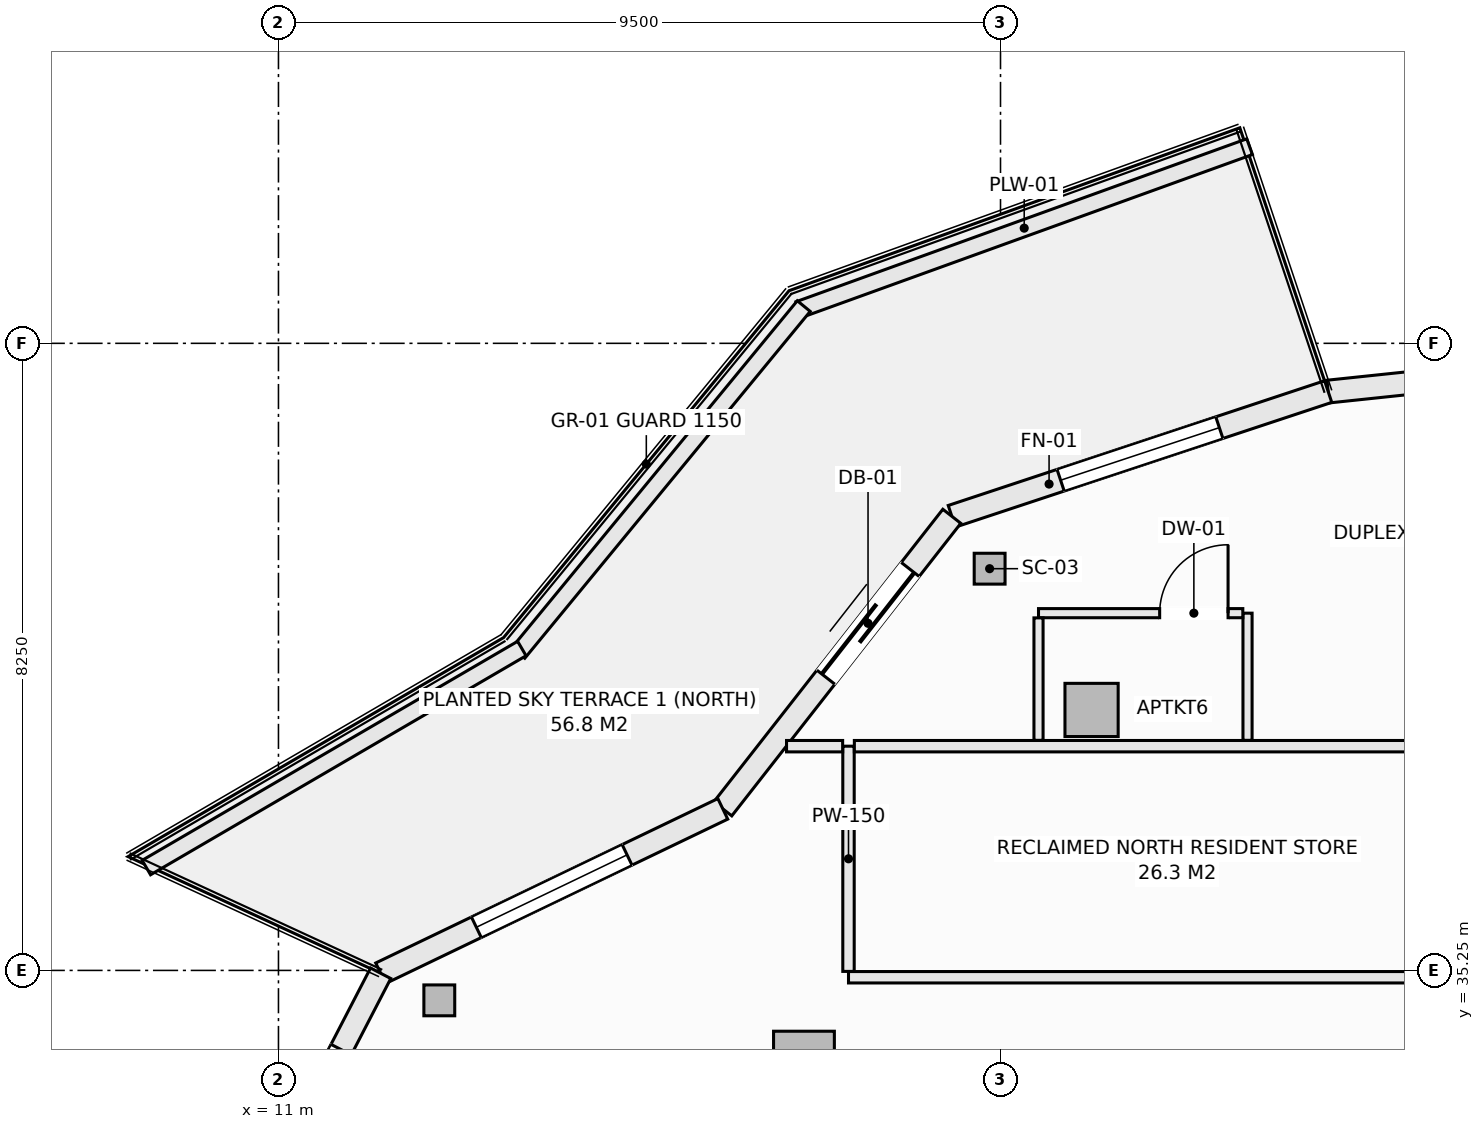
"""IFC4 building model, lengths in metres.
Left out: names, types, materials, properties, quantities, classifications, styles, units other than length and angle.
Written with IfcOpenShell. Run it as: python <this file> out.ifc"""

import sys

from ifc_helpers import new_model, si_unit, direction, frame, frame_2d, origin, origin_2d, place, context, subcontext, project, spatial, rectangle, hollow_rectangle, extrude, element, fill, save


model = new_model("IFC4")
c1 = context("Model", 3, precision=1e-05, world=origin(), true_north=direction((0.0, 1.0)))
c2 = subcontext(c1, "Body", "Model", "MODEL_VIEW")
j1 = project(units=[si_unit("LENGTHUNIT", "METRE"), si_unit("PLANEANGLEUNIT", "RADIAN")], contexts=[c1])
p1 = place(None, origin())
s1 = spatial("IfcSite", under=j1, at=p1, CompositionType="ELEMENT")
p2 = place(p1, origin())
s2 = spatial("IfcBuilding", under=s1, at=p2, CompositionType="ELEMENT")
p3 = place(p2, frame((0.0, 0.0, 272.3)))
s3 = spatial("IfcBuildingStorey", under=s2, at=p3, CompositionType="ELEMENT", Elevation=272.3)
for number, where, z_axis, x_axis in (
    (1, (20.357, 40.535, -0.27), (0.0, 0.0, 1.0), (1.0, 0.0, 0.0)),
    (2, (13.116, 34.856, -0.27), (0.0, 0.0, 1.0), (1.0, 0.0, 0.0)),
):
    element("IfcColumn", number, at=place(p3, frame(where, z_axis=z_axis, x_axis=x_axis)), inside=s3, PredefinedType="COLUMN", context=c2, shape_type="SweptSolid", body=[
        extrude(hollow_rectangle(XDim=0.406, YDim=0.406, WallThickness=0.016, at=origin_2d()), origin(), (0.0, 0.0, 1.0), 3.25),
    ])
p4 = place(p3, frame((21.698, 38.677, -0.27), z_axis=(0.0, 0.0, 1.0), x_axis=(1.0, 0.0, 0.0)))
e3 = element("IfcColumn", 3, at=p4, inside=s3, PredefinedType="COLUMN", context=c2, shape_type="SweptSolid", body=[
    extrude(rectangle(XDim=0.7, YDim=0.7, at=origin_2d()), origin(), (0.0, 0.0, 1.0), 3.25),
])
p5 = place(p3, frame((17.914, 34.05, -0.27), z_axis=(0.0, 0.0, 1.0), x_axis=(1.0, 0.0, 0.0)))
e4 = element("IfcColumn", 4, at=p5, inside=s3, PredefinedType="PILASTER", context=c2, shape_type="SweptSolid", body=[
    extrude(rectangle(XDim=0.8, YDim=0.8, at=origin_2d()), origin(), (0.0, 0.0, 1.0), 3.25),
])
p6 = place(p3, frame((24.811, 42.865, 0.0), z_axis=(0.0, 0.0, 1.0), x_axis=(0.9944966869, 0.104768028258, 0.0)))
e5 = element("IfcWall", 5, at=p6, inside=s3, PredefinedType="SOLIDWALL", context=c2, shape_type="SweptSolid", body=[
    extrude(rectangle(XDim=5.343, YDim=0.3, at=frame_2d((2.672, 0.0))), origin(), (0.0, 0.0, 1.0), 2.555),
])
p7 = place(p6, frame((1.572, 0.0, 0.72)))
e6 = element("IfcOpeningElement", 6, at=p7, cuts=e5, PredefinedType="OPENING", context=c2, shape_type="SweptSolid", body=[
    extrude(rectangle(XDim=2.2, YDim=1.65, at=frame_2d((1.1, 0.825))), frame((0.0, 0.16, 0.0), z_axis=(0.0, -1.0, 0.0), x_axis=(1.0, 0.0, 0.0)), (0.0, 0.0, 1.0), 0.32),
])
p8 = place(p3, frame((19.859, 41.225, 0.0), z_axis=(0.0, 0.0, 1.0), x_axis=(0.949252744709, 0.314514271001, 0.0)))
e7 = element("IfcWall", 7, at=p8, inside=s3, PredefinedType="SOLIDWALL", context=c2, shape_type="SweptSolid", body=[
    extrude(rectangle(XDim=5.216, YDim=0.3, at=frame_2d((2.608, 0.0))), origin(), (0.0, 0.0, 1.0), 2.555),
])
p9 = place(p8, frame((1.508, 0.0, 0.72)))
e8 = element("IfcOpeningElement", 8, at=p9, cuts=e7, PredefinedType="OPENING", context=c2, shape_type="SweptSolid", body=[
    extrude(rectangle(XDim=2.2, YDim=1.65, at=frame_2d((1.1, 0.825))), frame((0.0, 0.16, 0.0), z_axis=(0.0, -1.0, 0.0), x_axis=(1.0, 0.0, 0.0)), (0.0, 0.0, 1.0), 0.32),
])
p10 = place(p3, frame((16.846, 37.375, 0.0), z_axis=(0.0, 0.0, 1.0), x_axis=(0.616413297421, 0.78742278781, 0.0)))
e9 = element("IfcWall", 9, at=p10, inside=s3, PredefinedType="SOLIDWALL", context=c2, shape_type="SweptSolid", body=[
    extrude(rectangle(XDim=4.888, YDim=0.3, at=frame_2d((2.444, 0.0))), origin(), (0.0, 0.0, 1.0), 2.555),
])
p11 = place(p10, frame((2.2, 0.0, 0.0)))
e10 = element("IfcOpeningElement", 10, at=p11, cuts=e9, PredefinedType="OPENING", context=c2, shape_type="SweptSolid", body=[
    extrude(rectangle(XDim=1.8, YDim=2.25, at=frame_2d((0.9, 1.125))), frame((0.0, 0.16, 0.0), z_axis=(0.0, -1.0, 0.0), x_axis=(1.0, 0.0, 0.0)), (0.0, 0.0, 1.0), 0.32),
])
p12 = place(p3, frame((12.344, 35.212, 0.0), z_axis=(0.0, 0.0, 1.0), x_axis=(0.901346013132, 0.433099716706, 0.0)))
e11 = element("IfcWall", 11, at=p12, inside=s3, PredefinedType="SOLIDWALL", context=c2, shape_type="SweptSolid", body=[
    extrude(rectangle(XDim=4.994, YDim=0.3, at=frame_2d((2.497, 0.0))), origin(), (0.0, 0.0, 1.0), 2.555),
])
p13 = place(p12, frame((1.397, 0.0, 0.72)))
e12 = element("IfcOpeningElement", 12, at=p13, cuts=e11, PredefinedType="OPENING", context=c2, shape_type="SweptSolid", body=[
    extrude(rectangle(XDim=2.2, YDim=1.65, at=frame_2d((1.1, 0.825))), frame((0.0, 0.16, 0.0), z_axis=(0.0, -1.0, 0.0), x_axis=(1.0, 0.0, 0.0)), (0.0, 0.0, 1.0), 0.32),
])
p14 = place(p3, frame((10.293, 31.251, 0.0), z_axis=(0.0, 0.0, 1.0), x_axis=(0.459801070243, 0.888021945564, 0.0)))
e13 = element("IfcWall", 13, at=p14, inside=s3, PredefinedType="SOLIDWALL", context=c2, shape_type="SweptSolid", body=[
    extrude(rectangle(XDim=4.461, YDim=0.3, at=frame_2d((2.23, 0.0))), origin(), (0.0, 0.0, 1.0), 2.555),
])
p15 = place(p14, frame((1.13, 0.0, 0.72)))
e14 = element("IfcOpeningElement", 14, at=p15, cuts=e13, PredefinedType="OPENING", context=c2, shape_type="SweptSolid", body=[
    extrude(rectangle(XDim=2.2, YDim=1.65, at=frame_2d((1.1, 0.825))), frame((0.0, 0.16, 0.0), z_axis=(0.0, -1.0, 0.0), x_axis=(1.0, 0.0, 0.0)), (0.0, 0.0, 1.0), 0.32),
])
p16 = place(p3, frame((17.846, 43.944, 0.0), z_axis=(0.0, 0.0, 1.0), x_axis=(0.940465240036, 0.339889882585, 0.0)))
e15 = element("IfcWall", 15, at=p16, inside=s3, PredefinedType="PARAPET", context=c2, shape_type="SweptSolid", body=[
    extrude(rectangle(XDim=6.307, YDim=0.22, at=frame_2d((3.153, 0.0))), origin(), (0.0, 0.0, 1.0), 0.52),
])
p17 = place(p3, frame((14.156, 39.427, 0.0), z_axis=(0.0, 0.0, 1.0), x_axis=(0.635450933862, 0.772141250455, 0.0)))
e16 = element("IfcWall", 16, at=p17, inside=s3, PredefinedType="PARAPET", context=c2, shape_type="SweptSolid", body=[
    extrude(rectangle(XDim=5.91, YDim=0.22, at=frame_2d((2.955, 0.0))), origin(), (0.0, 0.0, 1.0), 0.52),
])
p18 = place(p3, frame((9.262, 36.603, 0.0), z_axis=(0.0, 0.0, 1.0), x_axis=(0.863803671285, 0.503828559606, 0.0)))
e17 = element("IfcWall", 17, at=p18, inside=s3, PredefinedType="PARAPET", context=c2, shape_type="SweptSolid", body=[
    extrude(rectangle(XDim=5.719, YDim=0.22, at=frame_2d((2.86, 0.0))), origin(), (0.0, 0.0, 1.0), 0.52),
])
p19 = place(p3, frame((18.5, 35.16, 0.0), z_axis=(0.0, 0.0, 1.0), x_axis=(1.0, 0.0, 0.0)))
e18 = element("IfcWall", 18, at=p19, inside=s3, PredefinedType="PARTITIONING", context=c2, shape_type="SweptSolid", body=[
    extrude(rectangle(XDim=8.573, YDim=0.15, at=frame_2d((4.287, 0.0))), origin(), (0.0, 0.0, 1.0), 2.98),
])
p20 = place(p3, frame((18.5, 35.237, 0.0), z_axis=(0.0, 0.0, 1.0), x_axis=(0.0, 1.0, 0.0)))
e19 = element("IfcWall", 19, at=p20, inside=s3, PredefinedType="PARTITIONING", context=c2, shape_type="SweptSolid", body=[
    extrude(rectangle(XDim=2.963, YDim=0.15, at=frame_2d((1.481, 0.0))), origin(), (0.0, 0.0, 1.0), 2.98),
])
p21 = place(p3, frame((17.685, 38.2, 0.0), z_axis=(0.0, 0.0, 1.0), x_axis=(1.0, 0.0, 0.0)))
e20 = element("IfcWall", 20, at=p21, inside=s3, PredefinedType="PARTITIONING", context=c2, shape_type="SweptSolid", body=[
    extrude(rectangle(XDim=0.738, YDim=0.15, at=frame_2d((0.369, 0.0))), origin(), (0.0, 0.0, 1.0), 2.98),
])
p22 = place(p3, frame((18.577, 38.2, 0.0), z_axis=(0.0, 0.0, 1.0), x_axis=(1.0, 0.0, 0.0)))
e21 = element("IfcWall", 21, at=p22, inside=s3, PredefinedType="PARTITIONING", context=c2, shape_type="SweptSolid", body=[
    extrude(rectangle(XDim=8.496, YDim=0.15, at=frame_2d((4.248, 0.0))), origin(), (0.0, 0.0, 1.0), 2.98),
])
p23 = place(p3, frame((23.75, 38.277, 0.0), z_axis=(0.0, 0.0, 1.0), x_axis=(0.0, 1.0, 0.0)))
e22 = element("IfcWall", 22, at=p23, inside=s3, PredefinedType="PARTITIONING", context=c2, shape_type="SweptSolid", body=[
    extrude(rectangle(XDim=1.673, YDim=0.12, at=frame_2d((0.836, 0.0))), origin(), (0.0, 0.0, 1.0), 2.98),
])
p24 = place(p3, frame((21.0, 39.95, 0.0), z_axis=(0.0, 0.0, 1.0), x_axis=(1.0, 0.0, 0.0)))
e23 = element("IfcWall", 23, at=p24, inside=s3, PredefinedType="PARTITIONING", context=c2, shape_type="SweptSolid", body=[
    extrude(rectangle(XDim=2.688, YDim=0.12, at=frame_2d((1.344, 0.0))), origin(), (0.0, 0.0, 1.0), 2.98),
])
p25 = place(p24, frame((1.594, 0.0, 0.0)))
e24 = element("IfcOpeningElement", 24, at=p25, cuts=e23, PredefinedType="OPENING", context=c2, shape_type="SweptSolid", body=[
    extrude(rectangle(XDim=0.9, YDim=2.1, at=frame_2d((0.45, 1.05))), frame((0.0, 0.07, 0.0), z_axis=(0.0, -1.0, 0.0), x_axis=(1.0, 0.0, 0.0)), (0.0, 0.0, 1.0), 0.14),
])
p26 = place(p3, frame((21.0, 38.277, 0.0), z_axis=(0.0, 0.0, 1.0), x_axis=(0.0, 1.0, 0.0)))
e25 = element("IfcWall", 25, at=p26, inside=s3, PredefinedType="PARTITIONING", context=c2, shape_type="SweptSolid", body=[
    extrude(rectangle(XDim=1.611, YDim=0.12, at=frame_2d((0.805, 0.0))), origin(), (0.0, 0.0, 1.0), 2.428),
])
p27 = place(p9, origin())
e26 = element("IfcWindow", 26, at=p27, inside=s3, PartitioningType="SINGLE_PANEL", PredefinedType="WINDOW", context=c2, shape_type="SweptSolid", body=[
    extrude(rectangle(XDim=2.2, YDim=1.65, at=frame_2d((1.1, 0.825))), frame((0.0, 0.03, 0.0), z_axis=(0.0, -1.0, 0.0), x_axis=(1.0, 0.0, 0.0)), (0.0, 0.0, 1.0), 0.06),
])
fill(e8, e26)
p28 = place(p11, origin())
e27 = element("IfcDoor", 27, at=p28, inside=s3, OperationType="SLIDING_TO_LEFT", PredefinedType="DOOR", context=c2, shape_type="SweptSolid", body=[
    extrude(rectangle(XDim=1.8, YDim=2.25, at=frame_2d((0.9, 1.125))), frame((0.0, 0.025, 0.0), z_axis=(0.0, -1.0, 0.0), x_axis=(1.0, 0.0, 0.0)), (0.0, 0.0, 1.0), 0.05),
])
fill(e10, e27)
p29 = place(p13, origin())
e28 = element("IfcWindow", 28, at=p29, inside=s3, PartitioningType="SINGLE_PANEL", PredefinedType="WINDOW", context=c2, shape_type="SweptSolid", body=[
    extrude(rectangle(XDim=2.2, YDim=1.65, at=frame_2d((1.1, 0.825))), frame((0.0, 0.03, 0.0), z_axis=(0.0, -1.0, 0.0), x_axis=(1.0, 0.0, 0.0)), (0.0, 0.0, 1.0), 0.06),
])
fill(e12, e28)
p30 = place(p15, origin())
e29 = element("IfcWindow", 29, at=p30, inside=s3, PartitioningType="SINGLE_PANEL", PredefinedType="WINDOW", context=c2, shape_type="SweptSolid", body=[
    extrude(rectangle(XDim=2.2, YDim=1.65, at=frame_2d((1.1, 0.825))), frame((0.0, 0.03, 0.0), z_axis=(0.0, -1.0, 0.0), x_axis=(1.0, 0.0, 0.0)), (0.0, 0.0, 1.0), 0.06),
])
fill(e14, e29)
p31 = place(p25, origin())
e30 = element("IfcDoor", 30, at=p31, inside=s3, OperationType="SINGLE_SWING_RIGHT", PredefinedType="DOOR", context=c2, shape_type="SweptSolid", body=[
    extrude(rectangle(XDim=0.9, YDim=2.1, at=frame_2d((0.45, 1.05))), frame((0.0, 0.025, 0.0), z_axis=(0.0, -1.0, 0.0), x_axis=(1.0, 0.0, 0.0)), (0.0, 0.0, 1.0), 0.05),
])
fill(e24, e30)
save(model, sys.argv[1])
